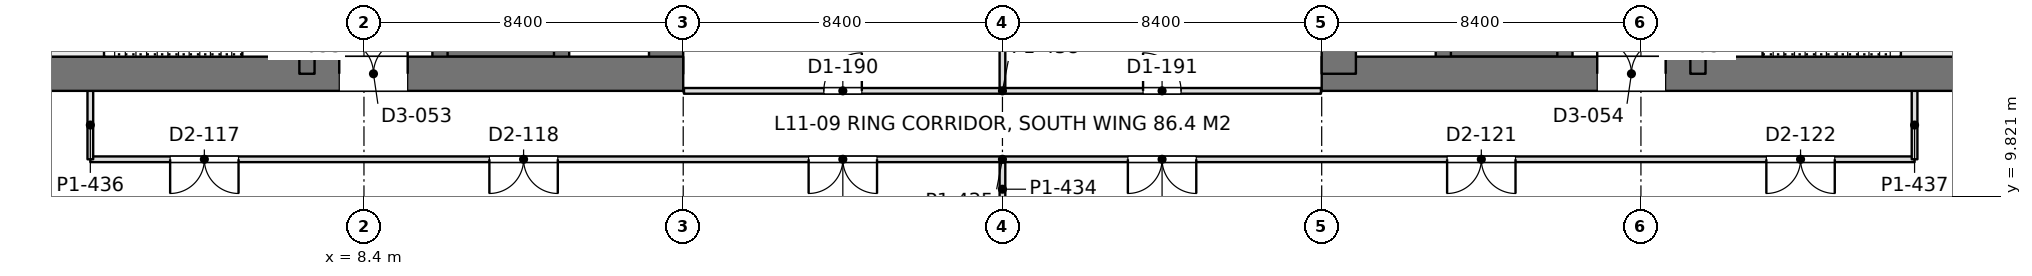
"""IFC4 building model, lengths in metres.
Left out: names, types, materials, properties, quantities, classifications, styles, units other than length and angle.
Written with IfcOpenShell. Run it as: python <this file> out.ifc"""

import sys

from ifc_helpers import new_model, si_unit, direction, frame, frame_2d, origin, place, context, subcontext, project, spatial, rectangle, extrude, element, fill, save


model = new_model("IFC4")
c1 = context("Model", 3, precision=1e-05, world=origin(), true_north=direction((0.0, 1.0)))
c2 = subcontext(c1, "Body", "Model", "MODEL_VIEW")
j1 = project(units=[si_unit("LENGTHUNIT", "METRE"), si_unit("PLANEANGLEUNIT", "RADIAN")], contexts=[c1])
p1 = place(None, origin())
s1 = spatial("IfcSite", under=j1, at=p1, CompositionType="ELEMENT")
p2 = place(p1, origin())
s2 = spatial("IfcBuilding", under=s1, at=p2, CompositionType="ELEMENT")
p3 = place(p2, frame((0.0, 0.0, 50.4)))
s3 = spatial("IfcBuildingStorey", under=s2, at=p3, CompositionType="ELEMENT", Elevation=50.4)
p4 = place(p3, frame((-1.2, 13.05, 0.0), z_axis=(0.0, 0.0, 1.0), x_axis=(1.0, 0.0, 0.0)))
e1 = element("IfcWall", 1, at=p4, inside=s3, PredefinedType="SHEAR", context=c2, shape_type="SweptSolid", body=[
    extrude(rectangle(XDim=18.0, YDim=0.9, at=frame_2d((9.0, 0.0))), origin(), (0.0, 0.0, 1.0), 4.5),
])
p5 = place(p4, frame((8.95, 0.0, 0.0)))
e2 = element("IfcOpeningElement", 2, at=p5, cuts=e1, PredefinedType="OPENING", context=c2, shape_type="SweptSolid", body=[
    extrude(rectangle(XDim=1.8, YDim=2.4, at=frame_2d((0.9, 1.2))), frame((0.0, 0.46, 0.0), z_axis=(0.0, -1.0, 0.0), x_axis=(1.0, 0.0, 0.0)), (0.0, 0.0, 1.0), 0.92),
])
p6 = place(p3, frame((16.35, 13.05, 0.0), z_axis=(0.0, 0.0, 1.0), x_axis=(0.0, 1.0, 0.0)))
e3 = element("IfcWall", 3, at=p6, inside=s3, PredefinedType="SHEAR", context=c2, shape_type="SweptSolid", body=[
    extrude(rectangle(XDim=24.3, YDim=0.9, at=frame_2d((12.15, 0.0))), origin(), (0.0, 0.0, 1.0), 4.5),
])
p7 = place(p3, frame((6.9, 13.05, 0.0), z_axis=(0.0, 0.0, 1.0), x_axis=(0.0, 1.0, 0.0)))
e4 = element("IfcWall", 4, at=p7, inside=s3, PredefinedType="SHEAR", context=c2, shape_type="SweptSolid", body=[
    extrude(rectangle(XDim=24.3, YDim=0.4, at=frame_2d((12.15, 0.0))), origin(), (0.0, 0.0, 1.0), 4.5),
])
p8 = place(p7, frame((1.3, 0.0, 0.0)))
e5 = element("IfcOpeningElement", 5, at=p8, cuts=e4, PredefinedType="OPENING", context=c2, shape_type="SweptSolid", body=[
    extrude(rectangle(XDim=1.0, YDim=2.2, at=frame_2d((0.5, 1.1))), frame((0.0, 0.21, 0.0), z_axis=(0.0, -1.0, 0.0), x_axis=(1.0, 0.0, 0.0)), (0.0, 0.0, 1.0), 0.42),
])
p9 = place(p7, frame((22.0, 0.0, 0.0)))
e6 = element("IfcOpeningElement", 6, at=p9, cuts=e4, PredefinedType="OPENING", context=c2, shape_type="SweptSolid", body=[
    extrude(rectangle(XDim=1.0, YDim=2.2, at=frame_2d((0.5, 1.1))), frame((0.0, 0.21, 0.0), z_axis=(0.0, -1.0, 0.0), x_axis=(1.0, 0.0, 0.0)), (0.0, 0.0, 1.0), 0.42),
])
p10 = place(p7, frame((5.55, 0.0, 0.0)))
e7 = element("IfcOpeningElement", 7, at=p10, cuts=e4, PredefinedType="OPENING", context=c2, shape_type="SweptSolid", body=[
    extrude(rectangle(XDim=1.0, YDim=2.2, at=frame_2d((0.5, 1.1))), frame((0.0, 0.21, 0.0), z_axis=(0.0, -1.0, 0.0), x_axis=(1.0, 0.0, 0.0)), (0.0, 0.0, 1.0), 0.42),
])
p11 = place(p7, frame((9.55, 0.0, 0.0)))
e8 = element("IfcOpeningElement", 8, at=p11, cuts=e4, PredefinedType="OPENING", context=c2, shape_type="SweptSolid", body=[
    extrude(rectangle(XDim=1.0, YDim=2.2, at=frame_2d((0.5, 1.1))), frame((0.0, 0.21, 0.0), z_axis=(0.0, -1.0, 0.0), x_axis=(1.0, 0.0, 0.0)), (0.0, 0.0, 1.0), 0.42),
])
p12 = place(p7, frame((12.8, 0.0, 0.0)))
e9 = element("IfcOpeningElement", 9, at=p12, cuts=e4, PredefinedType="OPENING", context=c2, shape_type="SweptSolid", body=[
    extrude(rectangle(XDim=1.1, YDim=2.2, at=frame_2d((0.55, 1.1))), frame((0.0, 0.21, 0.0), z_axis=(0.0, -1.0, 0.0), x_axis=(1.0, 0.0, 0.0)), (0.0, 0.0, 1.0), 0.42),
])
p13 = place(p7, frame((15.538, 0.0, 0.0)))
e10 = element("IfcOpeningElement", 10, at=p13, cuts=e4, PredefinedType="OPENING", context=c2, shape_type="SweptSolid", body=[
    extrude(rectangle(XDim=1.1, YDim=2.2, at=frame_2d((0.55, 1.1))), frame((0.0, 0.21, 0.0), z_axis=(0.0, -1.0, 0.0), x_axis=(1.0, 0.0, 0.0)), (0.0, 0.0, 1.0), 0.42),
])
p14 = place(p7, frame((18.262, 0.0, 0.0)))
e11 = element("IfcOpeningElement", 11, at=p14, cuts=e4, PredefinedType="OPENING", context=c2, shape_type="SweptSolid", body=[
    extrude(rectangle(XDim=1.1, YDim=2.2, at=frame_2d((0.55, 1.1))), frame((0.0, 0.21, 0.0), z_axis=(0.0, -1.0, 0.0), x_axis=(1.0, 0.0, 0.0)), (0.0, 0.0, 1.0), 0.42),
])
p15 = place(p3, frame((10.4, 13.05, 0.0), z_axis=(0.0, 0.0, 1.0), x_axis=(0.0, 1.0, 0.0)))
e12 = element("IfcWall", 12, at=p15, inside=s3, PredefinedType="SHEAR", context=c2, shape_type="SweptSolid", body=[
    extrude(rectangle(XDim=24.3, YDim=0.4, at=frame_2d((12.15, 0.0))), origin(), (0.0, 0.0, 1.0), 4.5),
])
p16 = place(p15, frame((1.5, 0.0, 0.0)))
e13 = element("IfcOpeningElement", 13, at=p16, cuts=e12, PredefinedType="OPENING", context=c2, shape_type="SweptSolid", body=[
    extrude(rectangle(XDim=1.1, YDim=2.2, at=frame_2d((0.55, 1.1))), frame((0.0, 0.21, 0.0), z_axis=(0.0, -1.0, 0.0), x_axis=(1.0, 0.0, 0.0)), (0.0, 0.0, 1.0), 0.42),
])
p17 = place(p15, frame((4.35, 0.0, 0.0)))
e14 = element("IfcOpeningElement", 14, at=p17, cuts=e12, PredefinedType="OPENING", context=c2, shape_type="SweptSolid", body=[
    extrude(rectangle(XDim=1.1, YDim=2.2, at=frame_2d((0.55, 1.1))), frame((0.0, 0.21, 0.0), z_axis=(0.0, -1.0, 0.0), x_axis=(1.0, 0.0, 0.0)), (0.0, 0.0, 1.0), 0.42),
])
p18 = place(p15, frame((7.2, 0.0, 0.0)))
e15 = element("IfcOpeningElement", 15, at=p18, cuts=e12, PredefinedType="OPENING", context=c2, shape_type="SweptSolid", body=[
    extrude(rectangle(XDim=1.1, YDim=2.2, at=frame_2d((0.55, 1.1))), frame((0.0, 0.21, 0.0), z_axis=(0.0, -1.0, 0.0), x_axis=(1.0, 0.0, 0.0)), (0.0, 0.0, 1.0), 0.42),
])
p19 = place(p15, frame((21.45, 0.0, 0.0)))
e16 = element("IfcOpeningElement", 16, at=p19, cuts=e12, PredefinedType="OPENING", context=c2, shape_type="SweptSolid", body=[
    extrude(rectangle(XDim=1.1, YDim=2.2, at=frame_2d((0.55, 1.1))), frame((0.0, 0.21, 0.0), z_axis=(0.0, -1.0, 0.0), x_axis=(1.0, 0.0, 0.0)), (0.0, 0.0, 1.0), 0.42),
])
p20 = place(p3, frame((13.6, 13.05, 0.0), z_axis=(0.0, 0.0, 1.0), x_axis=(0.0, 1.0, 0.0)))
e17 = element("IfcWall", 17, at=p20, inside=s3, PredefinedType="SHEAR", context=c2, shape_type="SweptSolid", body=[
    extrude(rectangle(XDim=24.3, YDim=0.4, at=frame_2d((12.15, 0.0))), origin(), (0.0, 0.0, 1.0), 4.5),
])
p21 = place(p3, frame((10.4, 13.65, 0.0), z_axis=(0.0, 0.0, 1.0), x_axis=(1.0, 0.0, 0.0)))
e18 = element("IfcWall", 18, at=p21, inside=s3, PredefinedType="SHEAR", context=c2, shape_type="SweptSolid", body=[
    extrude(rectangle(XDim=3.2, YDim=0.3, at=frame_2d((1.6, 0.0))), origin(), (0.0, 0.0, 1.0), 4.5),
])
p22 = place(p3, frame((33.6, 13.05, 0.0), z_axis=(0.0, 0.0, 1.0), x_axis=(1.0, 0.0, 0.0)))
e19 = element("IfcWall", 19, at=p22, inside=s3, PredefinedType="SHEAR", context=c2, shape_type="SweptSolid", body=[
    extrude(rectangle(XDim=18.0, YDim=0.9, at=frame_2d((9.0, 0.0))), origin(), (0.0, 0.0, 1.0), 4.5),
])
p23 = place(p22, frame((7.25, 0.0, 0.0)))
e20 = element("IfcOpeningElement", 20, at=p23, cuts=e19, PredefinedType="OPENING", context=c2, shape_type="SweptSolid", body=[
    extrude(rectangle(XDim=1.8, YDim=2.4, at=frame_2d((0.9, 1.2))), frame((0.0, 0.46, 0.0), z_axis=(0.0, -1.0, 0.0), x_axis=(1.0, 0.0, 0.0)), (0.0, 0.0, 1.0), 0.92),
])
p24 = place(p3, frame((34.05, 13.05, 0.0), z_axis=(0.0, 0.0, 1.0), x_axis=(0.0, 1.0, 0.0)))
e21 = element("IfcWall", 21, at=p24, inside=s3, PredefinedType="SHEAR", context=c2, shape_type="SweptSolid", body=[
    extrude(rectangle(XDim=24.3, YDim=0.9, at=frame_2d((12.15, 0.0))), origin(), (0.0, 0.0, 1.0), 4.5),
])
p25 = place(p3, frame((43.5, 13.05, 0.0), z_axis=(0.0, 0.0, 1.0), x_axis=(0.0, 1.0, 0.0)))
e22 = element("IfcWall", 22, at=p25, inside=s3, PredefinedType="SHEAR", context=c2, shape_type="SweptSolid", body=[
    extrude(rectangle(XDim=24.3, YDim=0.4, at=frame_2d((12.15, 0.0))), origin(), (0.0, 0.0, 1.0), 4.5),
])
p26 = place(p25, frame((1.3, 0.0, 0.0)))
e23 = element("IfcOpeningElement", 23, at=p26, cuts=e22, PredefinedType="OPENING", context=c2, shape_type="SweptSolid", body=[
    extrude(rectangle(XDim=1.0, YDim=2.2, at=frame_2d((0.5, 1.1))), frame((0.0, 0.21, 0.0), z_axis=(0.0, -1.0, 0.0), x_axis=(1.0, 0.0, 0.0)), (0.0, 0.0, 1.0), 0.42),
])
p27 = place(p25, frame((22.0, 0.0, 0.0)))
e24 = element("IfcOpeningElement", 24, at=p27, cuts=e22, PredefinedType="OPENING", context=c2, shape_type="SweptSolid", body=[
    extrude(rectangle(XDim=1.0, YDim=2.2, at=frame_2d((0.5, 1.1))), frame((0.0, 0.21, 0.0), z_axis=(0.0, -1.0, 0.0), x_axis=(1.0, 0.0, 0.0)), (0.0, 0.0, 1.0), 0.42),
])
p28 = place(p25, frame((5.55, 0.0, 0.0)))
e25 = element("IfcOpeningElement", 25, at=p28, cuts=e22, PredefinedType="OPENING", context=c2, shape_type="SweptSolid", body=[
    extrude(rectangle(XDim=1.0, YDim=2.2, at=frame_2d((0.5, 1.1))), frame((0.0, 0.21, 0.0), z_axis=(0.0, -1.0, 0.0), x_axis=(1.0, 0.0, 0.0)), (0.0, 0.0, 1.0), 0.42),
])
p29 = place(p25, frame((9.55, 0.0, 0.0)))
e26 = element("IfcOpeningElement", 26, at=p29, cuts=e22, PredefinedType="OPENING", context=c2, shape_type="SweptSolid", body=[
    extrude(rectangle(XDim=1.0, YDim=2.2, at=frame_2d((0.5, 1.1))), frame((0.0, 0.21, 0.0), z_axis=(0.0, -1.0, 0.0), x_axis=(1.0, 0.0, 0.0)), (0.0, 0.0, 1.0), 0.42),
])
p30 = place(p25, frame((12.8, 0.0, 0.0)))
e27 = element("IfcOpeningElement", 27, at=p30, cuts=e22, PredefinedType="OPENING", context=c2, shape_type="SweptSolid", body=[
    extrude(rectangle(XDim=1.1, YDim=2.2, at=frame_2d((0.55, 1.1))), frame((0.0, 0.21, 0.0), z_axis=(0.0, -1.0, 0.0), x_axis=(1.0, 0.0, 0.0)), (0.0, 0.0, 1.0), 0.42),
])
p31 = place(p25, frame((15.538, 0.0, 0.0)))
e28 = element("IfcOpeningElement", 28, at=p31, cuts=e22, PredefinedType="OPENING", context=c2, shape_type="SweptSolid", body=[
    extrude(rectangle(XDim=1.1, YDim=2.2, at=frame_2d((0.55, 1.1))), frame((0.0, 0.21, 0.0), z_axis=(0.0, -1.0, 0.0), x_axis=(1.0, 0.0, 0.0)), (0.0, 0.0, 1.0), 0.42),
])
p32 = place(p25, frame((18.262, 0.0, 0.0)))
e29 = element("IfcOpeningElement", 29, at=p32, cuts=e22, PredefinedType="OPENING", context=c2, shape_type="SweptSolid", body=[
    extrude(rectangle(XDim=1.1, YDim=2.2, at=frame_2d((0.55, 1.1))), frame((0.0, 0.21, 0.0), z_axis=(0.0, -1.0, 0.0), x_axis=(1.0, 0.0, 0.0)), (0.0, 0.0, 1.0), 0.42),
])
p33 = place(p3, frame((40.0, 13.05, 0.0), z_axis=(0.0, 0.0, 1.0), x_axis=(0.0, 1.0, 0.0)))
e30 = element("IfcWall", 30, at=p33, inside=s3, PredefinedType="SHEAR", context=c2, shape_type="SweptSolid", body=[
    extrude(rectangle(XDim=24.3, YDim=0.4, at=frame_2d((12.15, 0.0))), origin(), (0.0, 0.0, 1.0), 4.5),
])
p34 = place(p33, frame((1.5, 0.0, 0.0)))
e31 = element("IfcOpeningElement", 31, at=p34, cuts=e30, PredefinedType="OPENING", context=c2, shape_type="SweptSolid", body=[
    extrude(rectangle(XDim=1.1, YDim=2.2, at=frame_2d((0.55, 1.1))), frame((0.0, 0.21, 0.0), z_axis=(0.0, -1.0, 0.0), x_axis=(1.0, 0.0, 0.0)), (0.0, 0.0, 1.0), 0.42),
])
p35 = place(p33, frame((4.35, 0.0, 0.0)))
e32 = element("IfcOpeningElement", 32, at=p35, cuts=e30, PredefinedType="OPENING", context=c2, shape_type="SweptSolid", body=[
    extrude(rectangle(XDim=1.1, YDim=2.2, at=frame_2d((0.55, 1.1))), frame((0.0, 0.21, 0.0), z_axis=(0.0, -1.0, 0.0), x_axis=(1.0, 0.0, 0.0)), (0.0, 0.0, 1.0), 0.42),
])
p36 = place(p33, frame((7.2, 0.0, 0.0)))
e33 = element("IfcOpeningElement", 33, at=p36, cuts=e30, PredefinedType="OPENING", context=c2, shape_type="SweptSolid", body=[
    extrude(rectangle(XDim=1.1, YDim=2.2, at=frame_2d((0.55, 1.1))), frame((0.0, 0.21, 0.0), z_axis=(0.0, -1.0, 0.0), x_axis=(1.0, 0.0, 0.0)), (0.0, 0.0, 1.0), 0.42),
])
p37 = place(p33, frame((21.45, 0.0, 0.0)))
e34 = element("IfcOpeningElement", 34, at=p37, cuts=e30, PredefinedType="OPENING", context=c2, shape_type="SweptSolid", body=[
    extrude(rectangle(XDim=1.1, YDim=2.2, at=frame_2d((0.55, 1.1))), frame((0.0, 0.21, 0.0), z_axis=(0.0, -1.0, 0.0), x_axis=(1.0, 0.0, 0.0)), (0.0, 0.0, 1.0), 0.42),
])
p38 = place(p3, frame((36.8, 13.05, 0.0), z_axis=(0.0, 0.0, 1.0), x_axis=(0.0, 1.0, 0.0)))
e35 = element("IfcWall", 35, at=p38, inside=s3, PredefinedType="SHEAR", context=c2, shape_type="SweptSolid", body=[
    extrude(rectangle(XDim=24.3, YDim=0.4, at=frame_2d((12.15, 0.0))), origin(), (0.0, 0.0, 1.0), 4.5),
])
p39 = place(p3, frame((40.0, 13.65, 0.0), z_axis=(0.0, 0.0, 1.0), x_axis=(-1.0, 0.0, 0.0)))
e36 = element("IfcWall", 36, at=p39, inside=s3, PredefinedType="SHEAR", context=c2, shape_type="SweptSolid", body=[
    extrude(rectangle(XDim=3.2, YDim=0.3, at=frame_2d((1.6, 0.0))), origin(), (0.0, 0.0, 1.0), 4.5),
])
p40 = place(p3, frame((25.2, 9.299, 0.0), z_axis=(0.0, 0.0, 1.0), x_axis=(0.0, 1.0, 0.0)))
e37 = element("IfcWall", 37, at=p40, inside=s3, PredefinedType="PARTITIONING", context=c2, shape_type="SweptSolid", body=[
    extrude(rectangle(XDim=1.427, YDim=0.15, at=frame_2d((0.713, 0.0))), origin(), (0.0, 0.0, 1.0), 3.74),
])
p41 = place(p3, frame((1.2, 10.8, 0.0), z_axis=(0.0, 0.0, 1.0), x_axis=(1.0, 0.0, 0.0)))
e38 = element("IfcWall", 38, at=p41, inside=s3, PredefinedType="PARTITIONING", context=c2, shape_type="SweptSolid", body=[
    extrude(rectangle(XDim=48.0, YDim=0.15, at=frame_2d((24.0, 0.0))), origin(), (0.0, 0.0, 1.0), 3.74),
])
p42 = place(p41, frame((2.1, 0.0, 0.0)))
e39 = element("IfcOpeningElement", 39, at=p42, cuts=e38, PredefinedType="OPENING", context=c2, shape_type="SweptSolid", body=[
    extrude(rectangle(XDim=1.8, YDim=2.2, at=frame_2d((0.9, 1.1))), frame((0.0, 0.085, 0.0), z_axis=(0.0, -1.0, 0.0), x_axis=(1.0, 0.0, 0.0)), (0.0, 0.0, 1.0), 0.17),
])
p43 = place(p41, frame((10.5, 0.0, 0.0)))
e40 = element("IfcOpeningElement", 40, at=p43, cuts=e38, PredefinedType="OPENING", context=c2, shape_type="SweptSolid", body=[
    extrude(rectangle(XDim=1.8, YDim=2.2, at=frame_2d((0.9, 1.1))), frame((0.0, 0.085, 0.0), z_axis=(0.0, -1.0, 0.0), x_axis=(1.0, 0.0, 0.0)), (0.0, 0.0, 1.0), 0.17),
])
p44 = place(p41, frame((18.9, 0.0, 0.0)))
e41 = element("IfcOpeningElement", 41, at=p44, cuts=e38, PredefinedType="OPENING", context=c2, shape_type="SweptSolid", body=[
    extrude(rectangle(XDim=1.8, YDim=2.2, at=frame_2d((0.9, 1.1))), frame((0.0, 0.085, 0.0), z_axis=(0.0, -1.0, 0.0), x_axis=(1.0, 0.0, 0.0)), (0.0, 0.0, 1.0), 0.17),
])
p45 = place(p41, frame((27.3, 0.0, 0.0)))
e42 = element("IfcOpeningElement", 42, at=p45, cuts=e38, PredefinedType="OPENING", context=c2, shape_type="SweptSolid", body=[
    extrude(rectangle(XDim=1.8, YDim=2.2, at=frame_2d((0.9, 1.1))), frame((0.0, 0.085, 0.0), z_axis=(0.0, -1.0, 0.0), x_axis=(1.0, 0.0, 0.0)), (0.0, 0.0, 1.0), 0.17),
])
p46 = place(p41, frame((35.7, 0.0, 0.0)))
e43 = element("IfcOpeningElement", 43, at=p46, cuts=e38, PredefinedType="OPENING", context=c2, shape_type="SweptSolid", body=[
    extrude(rectangle(XDim=1.8, YDim=2.2, at=frame_2d((0.9, 1.1))), frame((0.0, 0.085, 0.0), z_axis=(0.0, -1.0, 0.0), x_axis=(1.0, 0.0, 0.0)), (0.0, 0.0, 1.0), 0.17),
])
p47 = place(p41, frame((44.1, 0.0, 0.0)))
e44 = element("IfcOpeningElement", 44, at=p47, cuts=e38, PredefinedType="OPENING", context=c2, shape_type="SweptSolid", body=[
    extrude(rectangle(XDim=1.8, YDim=2.2, at=frame_2d((0.9, 1.1))), frame((0.0, 0.085, 0.0), z_axis=(0.0, -1.0, 0.0), x_axis=(1.0, 0.0, 0.0)), (0.0, 0.0, 1.0), 0.17),
])
for number, where, z_axis, x_axis in (
    (45, (1.2, 10.8, 0.0), (0.0, 0.0, 1.0), (0.0, 1.0, 0.0)),
    (46, (49.2, 10.8, 0.0), (0.0, 0.0, 1.0), (0.0, 1.0, 0.0)),
):
    element("IfcWall", number, at=place(p3, frame(where, z_axis=z_axis, x_axis=x_axis)), inside=s3, PredefinedType="PARTITIONING", context=c2, shape_type="SweptSolid", body=[
        extrude(rectangle(XDim=1.802, YDim=0.15, at=frame_2d((0.901, 0.0))), origin(), (0.0, 0.0, 1.0), 4.34),
    ])
p48 = place(p3, frame((16.82, 12.6, 0.0), z_axis=(0.0, 0.0, 1.0), x_axis=(1.0, 0.0, 0.0)))
e47 = element("IfcWall", 47, at=p48, inside=s3, PredefinedType="PARTITIONING", context=c2, shape_type="SweptSolid", body=[
    extrude(rectangle(XDim=16.76, YDim=0.15, at=frame_2d((8.38, 0.0))), origin(), (0.0, 0.0, 1.0), 3.74),
])
p49 = place(p48, frame((3.68, 0.0, 0.0)))
e48 = element("IfcOpeningElement", 48, at=p49, cuts=e47, PredefinedType="OPENING", context=c2, shape_type="SweptSolid", body=[
    extrude(rectangle(XDim=1.0, YDim=2.2, at=frame_2d((0.5, 1.1))), frame((0.0, 0.085, 0.0), z_axis=(0.0, -1.0, 0.0), x_axis=(1.0, 0.0, 0.0)), (0.0, 0.0, 1.0), 0.17),
])
p50 = place(p48, frame((12.08, 0.0, 0.0)))
e49 = element("IfcOpeningElement", 49, at=p50, cuts=e47, PredefinedType="OPENING", context=c2, shape_type="SweptSolid", body=[
    extrude(rectangle(XDim=1.0, YDim=2.2, at=frame_2d((0.5, 1.1))), frame((0.0, 0.085, 0.0), z_axis=(0.0, -1.0, 0.0), x_axis=(1.0, 0.0, 0.0)), (0.0, 0.0, 1.0), 0.17),
])
p51 = place(p3, frame((25.2, 12.674, 0.0), z_axis=(0.0, 0.0, 1.0), x_axis=(0.0, 1.0, 0.0)))
e50 = element("IfcWall", 50, at=p51, inside=s3, PredefinedType="PARTITIONING", context=c2, shape_type="SweptSolid", body=[
    extrude(rectangle(XDim=3.527, YDim=0.15, at=frame_2d((1.763, 0.0))), origin(), (0.0, 0.0, 1.0), 3.74),
])
p52 = place(p5, origin())
e51 = element("IfcDoor", 51, at=p52, inside=s3, OperationType="DOUBLE_DOOR_SINGLE_SWING", PredefinedType="DOOR", context=c2, shape_type="SweptSolid", body=[
    extrude(rectangle(XDim=1.8, YDim=2.4, at=frame_2d((0.9, 1.2))), frame((0.0, 0.025, 0.0), z_axis=(0.0, -1.0, 0.0), x_axis=(1.0, 0.0, 0.0)), (0.0, 0.0, 1.0), 0.05),
])
fill(e2, e51)
p53 = place(p23, origin())
e52 = element("IfcDoor", 52, at=p53, inside=s3, OperationType="DOUBLE_DOOR_SINGLE_SWING", PredefinedType="DOOR", context=c2, shape_type="SweptSolid", body=[
    extrude(rectangle(XDim=1.8, YDim=2.4, at=frame_2d((0.9, 1.2))), frame((0.0, 0.025, 0.0), z_axis=(0.0, -1.0, 0.0), x_axis=(1.0, 0.0, 0.0)), (0.0, 0.0, 1.0), 0.05),
])
fill(e20, e52)
p54 = place(p42, frame((1.8, 0.0, 0.0), z_axis=(0.0, 0.0, 1.0), x_axis=(-1.0, 0.0, 0.0)))
e53 = element("IfcDoor", 53, at=p54, inside=s3, OperationType="DOUBLE_DOOR_SINGLE_SWING", PredefinedType="DOOR", context=c2, shape_type="SweptSolid", body=[
    extrude(rectangle(XDim=1.8, YDim=2.2, at=frame_2d((0.9, 1.1))), frame((0.0, 0.025, 0.0), z_axis=(0.0, -1.0, 0.0), x_axis=(1.0, 0.0, 0.0)), (0.0, 0.0, 1.0), 0.05),
])
fill(e39, e53)
p55 = place(p43, frame((1.8, 0.0, 0.0), z_axis=(0.0, 0.0, 1.0), x_axis=(-1.0, 0.0, 0.0)))
e54 = element("IfcDoor", 54, at=p55, inside=s3, OperationType="DOUBLE_DOOR_SINGLE_SWING", PredefinedType="DOOR", context=c2, shape_type="SweptSolid", body=[
    extrude(rectangle(XDim=1.8, YDim=2.2, at=frame_2d((0.9, 1.1))), frame((0.0, 0.025, 0.0), z_axis=(0.0, -1.0, 0.0), x_axis=(1.0, 0.0, 0.0)), (0.0, 0.0, 1.0), 0.05),
])
fill(e40, e54)
p56 = place(p44, frame((1.8, 0.0, 0.0), z_axis=(0.0, 0.0, 1.0), x_axis=(-1.0, 0.0, 0.0)))
e55 = element("IfcDoor", 55, at=p56, inside=s3, OperationType="DOUBLE_DOOR_SINGLE_SWING", PredefinedType="DOOR", context=c2, shape_type="SweptSolid", body=[
    extrude(rectangle(XDim=1.8, YDim=2.2, at=frame_2d((0.9, 1.1))), frame((0.0, 0.025, 0.0), z_axis=(0.0, -1.0, 0.0), x_axis=(1.0, 0.0, 0.0)), (0.0, 0.0, 1.0), 0.05),
])
fill(e41, e55)
p57 = place(p45, frame((1.8, 0.0, 0.0), z_axis=(0.0, 0.0, 1.0), x_axis=(-1.0, 0.0, 0.0)))
e56 = element("IfcDoor", 56, at=p57, inside=s3, OperationType="DOUBLE_DOOR_SINGLE_SWING", PredefinedType="DOOR", context=c2, shape_type="SweptSolid", body=[
    extrude(rectangle(XDim=1.8, YDim=2.2, at=frame_2d((0.9, 1.1))), frame((0.0, 0.025, 0.0), z_axis=(0.0, -1.0, 0.0), x_axis=(1.0, 0.0, 0.0)), (0.0, 0.0, 1.0), 0.05),
])
fill(e42, e56)
p58 = place(p46, frame((1.8, 0.0, 0.0), z_axis=(0.0, 0.0, 1.0), x_axis=(-1.0, 0.0, 0.0)))
e57 = element("IfcDoor", 57, at=p58, inside=s3, OperationType="DOUBLE_DOOR_SINGLE_SWING", PredefinedType="DOOR", context=c2, shape_type="SweptSolid", body=[
    extrude(rectangle(XDim=1.8, YDim=2.2, at=frame_2d((0.9, 1.1))), frame((0.0, 0.025, 0.0), z_axis=(0.0, -1.0, 0.0), x_axis=(1.0, 0.0, 0.0)), (0.0, 0.0, 1.0), 0.05),
])
fill(e43, e57)
p59 = place(p47, frame((1.8, 0.0, 0.0), z_axis=(0.0, 0.0, 1.0), x_axis=(-1.0, 0.0, 0.0)))
e58 = element("IfcDoor", 58, at=p59, inside=s3, OperationType="DOUBLE_DOOR_SINGLE_SWING", PredefinedType="DOOR", context=c2, shape_type="SweptSolid", body=[
    extrude(rectangle(XDim=1.8, YDim=2.2, at=frame_2d((0.9, 1.1))), frame((0.0, 0.025, 0.0), z_axis=(0.0, -1.0, 0.0), x_axis=(1.0, 0.0, 0.0)), (0.0, 0.0, 1.0), 0.05),
])
fill(e44, e58)
p60 = place(p49, origin())
e59 = element("IfcDoor", 59, at=p60, inside=s3, OperationType="SINGLE_SWING_RIGHT", PredefinedType="DOOR", context=c2, shape_type="SweptSolid", body=[
    extrude(rectangle(XDim=1.0, YDim=2.2, at=frame_2d((0.5, 1.1))), frame((0.0, 0.025, 0.0), z_axis=(0.0, -1.0, 0.0), x_axis=(1.0, 0.0, 0.0)), (0.0, 0.0, 1.0), 0.05),
])
fill(e48, e59)
p61 = place(p50, origin())
e60 = element("IfcDoor", 60, at=p61, inside=s3, OperationType="SINGLE_SWING_LEFT", PredefinedType="DOOR", context=c2, shape_type="SweptSolid", body=[
    extrude(rectangle(XDim=1.0, YDim=2.2, at=frame_2d((0.5, 1.1))), frame((0.0, 0.025, 0.0), z_axis=(0.0, -1.0, 0.0), x_axis=(1.0, 0.0, 0.0)), (0.0, 0.0, 1.0), 0.05),
])
fill(e49, e60)
save(model, sys.argv[1])
